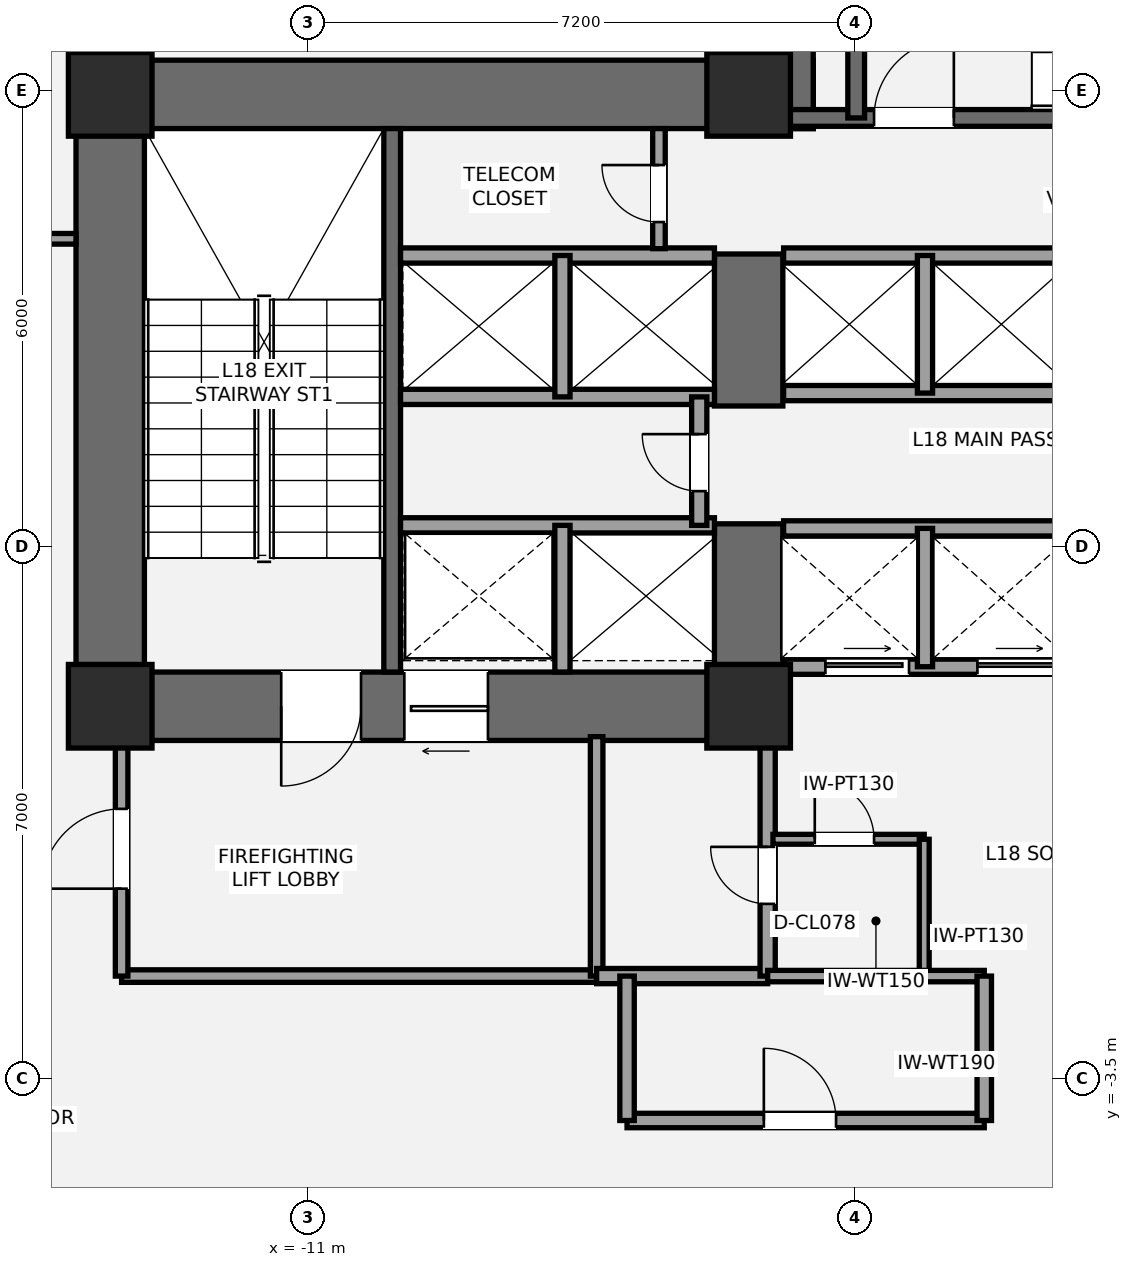
"""IFC4 building model, lengths in metres.
Left out: names, types, materials, properties, quantities, classifications, styles, units other than length and angle.
Written with IfcOpenShell. Run it as: python <this file> out.ifc"""

import sys

from ifc_helpers import new_model, si_unit, direction, frame, frame_2d, origin, origin_2d, place, context, subcontext, project, spatial, rectangle, extrude, element, fill, save


model = new_model("IFC4")
c1 = context("Model", 3, precision=1e-05, world=origin(), true_north=direction((0.0, 1.0)))
c2 = subcontext(c1, "Body", "Model", "MODEL_VIEW")
j1 = project(units=[si_unit("LENGTHUNIT", "METRE"), si_unit("PLANEANGLEUNIT", "RADIAN")], contexts=[c1])
p1 = place(None, origin())
s1 = spatial("IfcSite", under=j1, at=p1, CompositionType="ELEMENT")
p2 = place(p1, origin())
s2 = spatial("IfcBuilding", under=s1, at=p2, CompositionType="ELEMENT")
p3 = place(p2, frame((0.0, 0.0, 70.2)))
s3 = spatial("IfcBuildingStorey", under=s2, at=p3, CompositionType="ELEMENT", Elevation=70.2)
p4 = place(p3, frame((-13.6, 0.95, 0.0), z_axis=(0.0, 0.0, 1.0), x_axis=(0.0, 1.0, 0.0)))
e1 = element("IfcWall", 1, at=p4, inside=s3, PredefinedType="SHEAR", context=c2, shape_type="SweptSolid", body=[
    extrude(rectangle(XDim=8.95, YDim=0.9, at=frame_2d((4.475, 0.0))), origin(), (0.0, 0.0, 1.0), 3.6),
])
p5 = place(p3, frame((-14.05, 9.45, 0.0), z_axis=(0.0, 0.0, 1.0), x_axis=(1.0, 0.0, 0.0)))
e2 = element("IfcWall", 2, at=p5, inside=s3, PredefinedType="SHEAR", context=c2, shape_type="SweptSolid", body=[
    extrude(rectangle(XDim=9.7, YDim=0.9, at=frame_2d((4.85, 0.0))), origin(), (0.0, 0.0, 1.0), 3.6),
])
p6 = place(p3, frame((-4.75, 1.4, 0.0), z_axis=(0.0, 0.0, 1.0), x_axis=(-1.0, 0.0, 0.0)))
e3 = element("IfcWall", 3, at=p6, inside=s3, PredefinedType="SHEAR", context=c2, shape_type="SweptSolid", body=[
    extrude(rectangle(XDim=9.3, YDim=0.9, at=frame_2d((4.65, 0.0))), origin(), (0.0, 0.0, 1.0), 3.6),
])
p7 = place(p6, frame((5.55, 0.0, 0.0)))
e4 = element("IfcOpeningElement", 4, at=p7, cuts=e3, PredefinedType="OPENING", context=c2, shape_type="SweptSolid", body=[
    extrude(rectangle(XDim=1.05, YDim=2.15, at=frame_2d((0.525, 1.075))), frame((0.0, 0.46, 0.0), z_axis=(0.0, -1.0, 0.0), x_axis=(1.0, 0.0, 0.0)), (0.0, 0.0, 1.0), 0.92),
])
p8 = place(p6, frame((3.88, 0.0, 0.0)))
e5 = element("IfcOpeningElement", 5, at=p8, cuts=e3, PredefinedType="OPENING", context=c2, shape_type="SweptSolid", body=[
    extrude(rectangle(XDim=1.1, YDim=2.2, at=frame_2d((0.55, 1.1))), frame((0.0, 0.46, 0.0), z_axis=(0.0, -1.0, 0.0), x_axis=(1.0, 0.0, 0.0)), (0.0, 0.0, 1.0), 0.92),
])
p9 = place(p3, frame((-5.2, 0.95, 0.0), z_axis=(0.0, 0.0, 1.0), x_axis=(0.0, 1.0, 0.0)))
e6 = element("IfcWall", 6, at=p9, inside=s3, PredefinedType="SHEAR", context=c2, shape_type="SweptSolid", body=[
    extrude(rectangle(XDim=2.85, YDim=0.9, at=frame_2d((1.425, 0.0))), origin(), (0.0, 0.0, 1.0), 3.6),
])
p10 = place(p3, frame((-5.2, 5.35, 0.0), z_axis=(0.0, 0.0, 1.0), x_axis=(0.0, 1.0, 0.0)))
e7 = element("IfcWall", 7, at=p10, inside=s3, PredefinedType="SHEAR", context=c2, shape_type="SweptSolid", body=[
    extrude(rectangle(XDim=2.0, YDim=0.9, at=frame_2d((1.0, 0.0))), origin(), (0.0, 0.0, 1.0), 3.6),
])
p11 = place(p3, frame((-9.89, 1.85, 0.0), z_axis=(0.0, 0.0, 1.0), x_axis=(0.0, 1.0, 0.0)))
e8 = element("IfcWall", 8, at=p11, inside=s3, PredefinedType="SHEAR", context=c2, shape_type="SweptSolid", body=[
    extrude(rectangle(XDim=7.15, YDim=0.22, at=frame_2d((3.575, 0.0))), origin(), (0.0, 0.0, 1.0), 3.6),
])
p12 = place(p3, frame((-4.8, 9.0, 0.0), z_axis=(0.0, 0.0, 1.0), x_axis=(0.0, 1.0, 0.0)))
e9 = element("IfcWall", 9, at=p12, inside=s3, PredefinedType="SHEAR", context=c2, shape_type="SweptSolid", body=[
    extrude(rectangle(XDim=4.3, YDim=0.9, at=frame_2d((2.15, 0.0))), origin(), (0.0, 0.0, 1.0), 3.6),
])
p13 = place(p3, frame((-4.7, 9.14, 0.0), z_axis=(0.0, 0.0, 1.0), x_axis=(1.0, 0.0, 0.0)))
e10 = element("IfcWall", 10, at=p13, inside=s3, PredefinedType="SHEAR", context=c2, shape_type="SweptSolid", body=[
    extrude(rectangle(XDim=9.3, YDim=0.22, at=frame_2d((4.65, 0.0))), origin(), (0.0, 0.0, 1.0), 3.6),
])
p14 = place(p13, frame((1.15, 0.0, 0.0)))
e11 = element("IfcOpeningElement", 11, at=p14, cuts=e10, PredefinedType="OPENING", context=c2, shape_type="SweptSolid", body=[
    extrude(rectangle(XDim=1.05, YDim=2.15, at=frame_2d((0.525, 1.075))), frame((0.0, 0.12, 0.0), z_axis=(0.0, -1.0, 0.0), x_axis=(1.0, 0.0, 0.0)), (0.0, 0.0, 1.0), 0.24),
])
p15 = place(p3, frame((-3.785, 9.14, 0.0), z_axis=(0.0, 0.0, 1.0), x_axis=(0.0, 1.0, 0.0)))
e12 = element("IfcWall", 12, at=p15, inside=s3, PredefinedType="SHEAR", context=c2, shape_type="SweptSolid", body=[
    extrude(rectangle(XDim=3.26, YDim=0.22, at=frame_2d((1.63, 0.0))), origin(), (0.0, 0.0, 1.0), 3.6),
])
for number, where, z_axis, x_axis in (
    (13, (-13.6, 1.4, 0.0), (0.0, 0.0, 1.0), (1.0, 0.0, 0.0)),
    (14, (-13.6, 9.45, 0.0), (0.0, 0.0, 1.0), (1.0, 0.0, 0.0)),
    (15, (-5.2, 1.4, 0.0), (0.0, 0.0, 1.0), (1.0, 0.0, 0.0)),
    (16, (-5.2, 9.45, 0.0), (0.0, 0.0, 1.0), (1.0, 0.0, 0.0)),
):
    element("IfcColumn", number, at=place(p3, frame(where, z_axis=z_axis, x_axis=x_axis)), inside=s3, PredefinedType="COLUMN", context=c2, shape_type="SweptSolid", body=[
        extrude(rectangle(XDim=1.1, YDim=1.1, at=origin_2d()), origin(), (0.0, 0.0, 1.0), 3.6),
    ])
p16 = place(p3, frame((-13.45, -2.15, 0.0), z_axis=(0.0, 0.0, 1.0), x_axis=(1.0, 0.0, 0.0)))
e17 = element("IfcWall", 17, at=p16, inside=s3, PredefinedType="PARTITIONING", context=c2, shape_type="SweptSolid", body=[
    extrude(rectangle(XDim=6.25, YDim=0.165, at=frame_2d((3.125, 0.0))), origin(), (0.0, 0.0, 1.0), 3.4),
])
p17 = place(p3, frame((-13.45, -2.15, 0.0), z_axis=(0.0, 0.0, 1.0), x_axis=(0.0, 1.0, 0.0)))
e18 = element("IfcWall", 18, at=p17, inside=s3, PredefinedType="PARTITIONING", context=c2, shape_type="SweptSolid", body=[
    extrude(rectangle(XDim=3.15, YDim=0.165, at=frame_2d((1.575, 0.0))), origin(), (0.0, 0.0, 1.0), 2.853),
])
p18 = place(p17, frame((1.15, 0.0, 0.0)))
e19 = element("IfcOpeningElement", 19, at=p18, cuts=e18, PredefinedType="OPENING", context=c2, shape_type="SweptSolid", body=[
    extrude(rectangle(XDim=1.05, YDim=2.15, at=frame_2d((0.525, 1.075))), frame((0.0, 0.093, 0.0), z_axis=(0.0, -1.0, 0.0), x_axis=(1.0, 0.0, 0.0)), (0.0, 0.0, 1.0), 0.185),
])
p19 = place(p3, frame((-7.2, -2.15, 0.0), z_axis=(0.0, 0.0, 1.0), x_axis=(0.0, 1.0, 0.0)))
e20 = element("IfcWall", 20, at=p19, inside=s3, PredefinedType="PARTITIONING", context=c2, shape_type="SweptSolid", body=[
    extrude(rectangle(XDim=3.15, YDim=0.165, at=frame_2d((1.575, 0.0))), origin(), (0.0, 0.0, 1.0), 3.4),
])
p20 = place(p3, frame((-7.2, -2.15, 0.0), z_axis=(0.0, 0.0, 1.0), x_axis=(1.0, 0.0, 0.0)))
e21 = element("IfcWall", 21, at=p20, inside=s3, PredefinedType="SOLIDWALL", context=c2, shape_type="SweptSolid", body=[
    extrude(rectangle(XDim=2.25, YDim=0.2, at=frame_2d((1.125, 0.0))), origin(), (0.0, 0.0, 1.0), 3.4),
])
p21 = place(p3, frame((-4.95, -2.15, 0.0), z_axis=(0.0, 0.0, 1.0), x_axis=(0.0, 1.0, 0.0)))
e22 = element("IfcWall", 22, at=p21, inside=s3, PredefinedType="SOLIDWALL", context=c2, shape_type="SweptSolid", body=[
    extrude(rectangle(XDim=3.15, YDim=0.2, at=frame_2d((1.575, 0.0))), origin(), (0.0, 0.0, 1.0), 2.853),
])
p22 = place(p21, frame((0.95, 0.0, 0.0)))
e23 = element("IfcOpeningElement", 23, at=p22, cuts=e22, PredefinedType="OPENING", context=c2, shape_type="SweptSolid", body=[
    extrude(rectangle(XDim=0.75, YDim=2.1, at=frame_2d((0.375, 1.05))), frame((0.0, 0.11, 0.0), z_axis=(0.0, -1.0, 0.0), x_axis=(1.0, 0.0, 0.0)), (0.0, 0.0, 1.0), 0.22),
])
p23 = place(p3, frame((-4.88, -0.35, 0.0), z_axis=(0.0, 0.0, 1.0), x_axis=(1.0, 0.0, 0.0)))
e24 = element("IfcWall", 24, at=p23, inside=s3, PredefinedType="PARTITIONING", context=c2, shape_type="SweptSolid", body=[
    extrude(rectangle(XDim=1.99, YDim=0.13, at=frame_2d((0.995, 0.0))), origin(), (0.0, 0.0, 1.0), 3.4),
])
p24 = place(p23, frame((0.55, 0.0, 0.0)))
e25 = element("IfcOpeningElement", 25, at=p24, cuts=e24, PredefinedType="OPENING", context=c2, shape_type="SweptSolid", body=[
    extrude(rectangle(XDim=0.78, YDim=2.1, at=frame_2d((0.39, 1.05))), frame((0.0, 0.075, 0.0), z_axis=(0.0, -1.0, 0.0), x_axis=(1.0, 0.0, 0.0)), (0.0, 0.0, 1.0), 0.15),
])
p25 = place(p3, frame((-2.89, -2.15, 0.0), z_axis=(0.0, 0.0, 1.0), x_axis=(0.0, 1.0, 0.0)))
e26 = element("IfcWall", 26, at=p25, inside=s3, PredefinedType="PARTITIONING", context=c2, shape_type="SweptSolid", body=[
    extrude(rectangle(XDim=1.8, YDim=0.13, at=frame_2d((0.9, 0.0))), origin(), (0.0, 0.0, 1.0), 3.4),
])
p26 = place(p3, frame((-9.78, 3.78, 0.0), z_axis=(0.0, 0.0, 1.0), x_axis=(1.0, 0.0, 0.0)))
e27 = element("IfcWall", 27, at=p26, inside=s3, PredefinedType="SOLIDWALL", context=c2, shape_type="SweptSolid", body=[
    extrude(rectangle(XDim=4.13, YDim=0.2, at=frame_2d((2.065, 0.0))), origin(), (0.0, 0.0, 1.0), 3.4),
])
p27 = place(p3, frame((-7.65, 1.85, 0.0), z_axis=(0.0, 0.0, 1.0), x_axis=(0.0, 1.0, 0.0)))
e28 = element("IfcWall", 28, at=p27, inside=s3, PredefinedType="SOLIDWALL", context=c2, shape_type="SweptSolid", body=[
    extrude(rectangle(XDim=1.93, YDim=0.2, at=frame_2d((0.965, 0.0))), origin(), (0.0, 0.0, 1.0), 3.4),
])
for number, where, z_axis, x_axis in (
    (29, (-9.78, 5.47, 0.0), (0.0, 0.0, 1.0), (1.0, 0.0, 0.0)),
    (30, (-9.78, 7.33, 0.0), (0.0, 0.0, 1.0), (1.0, 0.0, 0.0)),
):
    element("IfcWall", number, at=place(p3, frame(where, z_axis=z_axis, x_axis=x_axis)), inside=s3, PredefinedType="SOLIDWALL", context=c2, shape_type="SweptSolid", body=[
        extrude(rectangle(XDim=4.13, YDim=0.2, at=frame_2d((2.065, 0.0))), origin(), (0.0, 0.0, 1.0), 3.4),
    ])
p28 = place(p3, frame((-7.65, 5.47, 0.0), z_axis=(0.0, 0.0, 1.0), x_axis=(0.0, 1.0, 0.0)))
e31 = element("IfcWall", 31, at=p28, inside=s3, PredefinedType="SOLIDWALL", context=c2, shape_type="SweptSolid", body=[
    extrude(rectangle(XDim=1.86, YDim=0.2, at=frame_2d((0.93, 0.0))), origin(), (0.0, 0.0, 1.0), 3.4),
])
p29 = place(p3, frame((-5.85, 3.78, 0.0), z_axis=(0.0, 0.0, 1.0), x_axis=(0.0, 1.0, 0.0)))
e32 = element("IfcWall", 32, at=p29, inside=s3, PredefinedType="SOLIDWALL", context=c2, shape_type="SweptSolid", body=[
    extrude(rectangle(XDim=1.69, YDim=0.2, at=frame_2d((0.845, 0.0))), origin(), (0.0, 0.0, 1.0), 3.4),
])
p30 = place(p29, frame((0.45, 0.0, 0.0)))
e33 = element("IfcOpeningElement", 33, at=p30, cuts=e32, PredefinedType="OPENING", context=c2, shape_type="SweptSolid", body=[
    extrude(rectangle(XDim=0.75, YDim=2.1, at=frame_2d((0.375, 1.05))), frame((0.0, 0.11, 0.0), z_axis=(0.0, -1.0, 0.0), x_axis=(1.0, 0.0, 0.0)), (0.0, 0.0, 1.0), 0.22),
])
p31 = place(p3, frame((-4.74, 1.92, 0.0), z_axis=(0.0, 0.0, 1.0), x_axis=(1.0, 0.0, 0.0)))
e34 = element("IfcWall", 34, at=p31, inside=s3, PredefinedType="SOLIDWALL", context=c2, shape_type="SweptSolid", body=[
    extrude(rectangle(XDim=3.86, YDim=0.2, at=frame_2d((1.93, 0.0))), origin(), (0.0, 0.0, 1.0), 2.39),
])
p32 = place(p31, frame((0.55, 0.0, 0.0)))
e35 = element("IfcOpeningElement", 35, at=p32, cuts=e34, PredefinedType="OPENING", context=c2, shape_type="SweptSolid", body=[
    extrude(rectangle(XDim=1.1, YDim=2.2, at=frame_2d((0.55, 1.1))), frame((0.0, 0.11, 0.0), z_axis=(0.0, -1.0, 0.0), x_axis=(1.0, 0.0, 0.0)), (0.0, 0.0, 1.0), 0.22),
])
p33 = place(p31, frame((2.55, 0.0, 0.0)))
e36 = element("IfcOpeningElement", 36, at=p33, cuts=e34, PredefinedType="OPENING", context=c2, shape_type="SweptSolid", body=[
    extrude(rectangle(XDim=1.1, YDim=2.2, at=frame_2d((0.55, 1.1))), frame((0.0, 0.11, 0.0), z_axis=(0.0, -1.0, 0.0), x_axis=(1.0, 0.0, 0.0)), (0.0, 0.0, 1.0), 0.22),
])
p34 = place(p3, frame((-4.74, 3.74, 0.0), z_axis=(0.0, 0.0, 1.0), x_axis=(1.0, 0.0, 0.0)))
e37 = element("IfcWall", 37, at=p34, inside=s3, PredefinedType="SOLIDWALL", context=c2, shape_type="SweptSolid", body=[
    extrude(rectangle(XDim=3.86, YDim=0.2, at=frame_2d((1.93, 0.0))), origin(), (0.0, 0.0, 1.0), 3.4),
])
p35 = place(p3, frame((-2.88, 1.92, 0.0), z_axis=(0.0, 0.0, 1.0), x_axis=(0.0, 1.0, 0.0)))
e38 = element("IfcWall", 38, at=p35, inside=s3, PredefinedType="SOLIDWALL", context=c2, shape_type="SweptSolid", body=[
    extrude(rectangle(XDim=1.82, YDim=0.2, at=frame_2d((0.91, 0.0))), origin(), (0.0, 0.0, 1.0), 3.4),
])
for number, where, z_axis, x_axis in (
    (39, (-4.74, 5.52, 0.0), (0.0, 0.0, 1.0), (1.0, 0.0, 0.0)),
    (40, (-4.74, 7.33, 0.0), (0.0, 0.0, 1.0), (1.0, 0.0, 0.0)),
):
    element("IfcWall", number, at=place(p3, frame(where, z_axis=z_axis, x_axis=x_axis)), inside=s3, PredefinedType="SOLIDWALL", context=c2, shape_type="SweptSolid", body=[
        extrude(rectangle(XDim=3.86, YDim=0.2, at=frame_2d((1.93, 0.0))), origin(), (0.0, 0.0, 1.0), 3.4),
    ])
p36 = place(p3, frame((-2.88, 5.52, 0.0), z_axis=(0.0, 0.0, 1.0), x_axis=(0.0, 1.0, 0.0)))
e41 = element("IfcWall", 41, at=p36, inside=s3, PredefinedType="SOLIDWALL", context=c2, shape_type="SweptSolid", body=[
    extrude(rectangle(XDim=1.81, YDim=0.2, at=frame_2d((0.905, 0.0))), origin(), (0.0, 0.0, 1.0), 3.4),
])
p37 = place(p3, frame((-6.38, 7.42, 0.0), z_axis=(0.0, 0.0, 1.0), x_axis=(0.0, 1.0, 0.0)))
e42 = element("IfcWall", 42, at=p37, inside=s3, PredefinedType="PARTITIONING", context=c2, shape_type="SweptSolid", body=[
    extrude(rectangle(XDim=1.58, YDim=0.165, at=frame_2d((0.79, 0.0))), origin(), (0.0, 0.0, 1.0), 3.4),
])
p38 = place(p37, frame((0.35, 0.0, 0.0)))
e43 = element("IfcOpeningElement", 43, at=p38, cuts=e42, PredefinedType="OPENING", context=c2, shape_type="SweptSolid", body=[
    extrude(rectangle(XDim=0.75, YDim=2.1, at=frame_2d((0.375, 1.05))), frame((0.0, 0.093, 0.0), z_axis=(0.0, -1.0, 0.0), x_axis=(1.0, 0.0, 0.0)), (0.0, 0.0, 1.0), 0.185),
])
p39 = place(p3, frame((-6.8, -4.05, 0.0), z_axis=(0.0, 0.0, 1.0), x_axis=(1.0, 0.0, 0.0)))
e44 = element("IfcWall", 44, at=p39, inside=s3, PredefinedType="PLUMBINGWALL", context=c2, shape_type="SweptSolid", body=[
    extrude(rectangle(XDim=4.7, YDim=0.19, at=frame_2d((2.35, 0.0))), origin(), (0.0, 0.0, 1.0), 2.933),
])
p40 = place(p39, frame((1.8, 0.0, 0.0)))
e45 = element("IfcOpeningElement", 45, at=p40, cuts=e44, PredefinedType="OPENING", context=c2, shape_type="SweptSolid", body=[
    extrude(rectangle(XDim=0.95, YDim=2.15, at=frame_2d((0.475, 1.075))), frame((0.0, 0.105, 0.0), z_axis=(0.0, -1.0, 0.0), x_axis=(1.0, 0.0, 0.0)), (0.0, 0.0, 1.0), 0.21),
])
p41 = place(p3, frame((-4.95, -2.15, 0.0), z_axis=(0.0, 0.0, 1.0), x_axis=(1.0, 0.0, 0.0)))
e46 = element("IfcWall", 46, at=p41, inside=s3, PredefinedType="PLUMBINGWALL", context=c2, shape_type="SweptSolid", body=[
    extrude(rectangle(XDim=2.85, YDim=0.15, at=frame_2d((1.425, 0.0))), origin(), (0.0, 0.0, 1.0), 3.4),
])
for number, where, z_axis, x_axis in (
    (47, (-6.8, -4.05, 0.0), (0.0, 0.0, 1.0), (0.0, 1.0, 0.0)),
    (48, (-2.1, -4.05, 0.0), (0.0, 0.0, 1.0), (0.0, 1.0, 0.0)),
):
    element("IfcWall", number, at=place(p3, frame(where, z_axis=z_axis, x_axis=x_axis)), inside=s3, PredefinedType="PLUMBINGWALL", context=c2, shape_type="SweptSolid", body=[
        extrude(rectangle(XDim=1.9, YDim=0.19, at=frame_2d((0.95, 0.0))), origin(), (0.0, 0.0, 1.0), 3.4),
    ])
p42 = place(p3, frame((-26.234, 7.55, 0.0), z_axis=(0.0, 0.0, 1.0), x_axis=(1.0, 0.0, 0.0)))
e49 = element("IfcWall", 49, at=p42, inside=s3, PredefinedType="PARTITIONING", context=c2, shape_type="SweptSolid", body=[
    extrude(rectangle(XDim=12.184, YDim=0.14, at=frame_2d((6.092, 0.0))), origin(), (0.0, 0.0, 1.0), 3.4),
])
p43 = place(p42, frame((1.84, 0.0, 0.0)))
e50 = element("IfcOpeningElement", 50, at=p43, cuts=e49, PredefinedType="OPENING", context=c2, shape_type="SweptSolid", body=[
    extrude(rectangle(XDim=0.92, YDim=2.15, at=frame_2d((0.46, 1.075))), frame((0.0, 0.08, 0.0), z_axis=(0.0, -1.0, 0.0), x_axis=(1.0, 0.0, 0.0)), (0.0, 0.0, 1.0), 0.16),
])
p44 = place(p7, origin())
e51 = element("IfcDoor", 51, at=p44, inside=s3, OperationType="SINGLE_SWING_RIGHT", PredefinedType="DOOR", context=c2, shape_type="SweptSolid", body=[
    extrude(rectangle(XDim=1.05, YDim=2.15, at=frame_2d((0.525, 1.075))), frame((0.0, 0.025, 0.0), z_axis=(0.0, -1.0, 0.0), x_axis=(1.0, 0.0, 0.0)), (0.0, 0.0, 1.0), 0.05),
])
fill(e4, e51)
p45 = place(p14, origin())
e52 = element("IfcDoor", 52, at=p45, inside=s3, OperationType="SINGLE_SWING_RIGHT", PredefinedType="DOOR", context=c2, shape_type="SweptSolid", body=[
    extrude(rectangle(XDim=1.05, YDim=2.15, at=frame_2d((0.525, 1.075))), frame((0.0, 0.025, 0.0), z_axis=(0.0, -1.0, 0.0), x_axis=(1.0, 0.0, 0.0)), (0.0, 0.0, 1.0), 0.05),
])
fill(e11, e52)
p46 = place(p18, origin())
e53 = element("IfcDoor", 53, at=p46, inside=s3, OperationType="SINGLE_SWING_LEFT", PredefinedType="DOOR", context=c2, shape_type="SweptSolid", body=[
    extrude(rectangle(XDim=1.05, YDim=2.15, at=frame_2d((0.525, 1.075))), frame((0.0, 0.025, 0.0), z_axis=(0.0, -1.0, 0.0), x_axis=(1.0, 0.0, 0.0)), (0.0, 0.0, 1.0), 0.05),
])
fill(e19, e53)
p47 = place(p22, origin())
e54 = element("IfcDoor", 54, at=p47, inside=s3, OperationType="SINGLE_SWING_RIGHT", PredefinedType="DOOR", context=c2, shape_type="SweptSolid", body=[
    extrude(rectangle(XDim=0.75, YDim=2.1, at=frame_2d((0.375, 1.05))), frame((0.0, 0.025, 0.0), z_axis=(0.0, -1.0, 0.0), x_axis=(1.0, 0.0, 0.0)), (0.0, 0.0, 1.0), 0.05),
])
fill(e23, e54)
p48 = place(p24, origin())
e55 = element("IfcDoor", 55, at=p48, inside=s3, OperationType="SINGLE_SWING_LEFT", PredefinedType="DOOR", context=c2, shape_type="SweptSolid", body=[
    extrude(rectangle(XDim=0.78, YDim=2.1, at=frame_2d((0.39, 1.05))), frame((0.0, 0.025, 0.0), z_axis=(0.0, -1.0, 0.0), x_axis=(1.0, 0.0, 0.0)), (0.0, 0.0, 1.0), 0.05),
])
fill(e25, e55)
p49 = place(p8, origin())
e56 = element("IfcDoor", 56, at=p49, inside=s3, OperationType="SLIDING_TO_LEFT", PredefinedType="DOOR", context=c2, shape_type="SweptSolid", body=[
    extrude(rectangle(XDim=1.1, YDim=2.2, at=frame_2d((0.55, 1.1))), frame((0.0, 0.025, 0.0), z_axis=(0.0, -1.0, 0.0), x_axis=(1.0, 0.0, 0.0)), (0.0, 0.0, 1.0), 0.05),
])
fill(e5, e56)
p50 = place(p30, origin())
e57 = element("IfcDoor", 57, at=p50, inside=s3, OperationType="SINGLE_SWING_RIGHT", PredefinedType="DOOR", context=c2, shape_type="SweptSolid", body=[
    extrude(rectangle(XDim=0.75, YDim=2.1, at=frame_2d((0.375, 1.05))), frame((0.0, 0.025, 0.0), z_axis=(0.0, -1.0, 0.0), x_axis=(1.0, 0.0, 0.0)), (0.0, 0.0, 1.0), 0.05),
])
fill(e33, e57)
p51 = place(p32, origin())
e58 = element("IfcDoor", 58, at=p51, inside=s3, OperationType="SLIDING_TO_LEFT", PredefinedType="DOOR", context=c2, shape_type="SweptSolid", body=[
    extrude(rectangle(XDim=1.1, YDim=2.2, at=frame_2d((0.55, 1.1))), frame((0.0, 0.025, 0.0), z_axis=(0.0, -1.0, 0.0), x_axis=(1.0, 0.0, 0.0)), (0.0, 0.0, 1.0), 0.05),
])
fill(e35, e58)
p52 = place(p33, origin())
e59 = element("IfcDoor", 59, at=p52, inside=s3, OperationType="SLIDING_TO_LEFT", PredefinedType="DOOR", context=c2, shape_type="SweptSolid", body=[
    extrude(rectangle(XDim=1.1, YDim=2.2, at=frame_2d((0.55, 1.1))), frame((0.0, 0.025, 0.0), z_axis=(0.0, -1.0, 0.0), x_axis=(1.0, 0.0, 0.0)), (0.0, 0.0, 1.0), 0.05),
])
fill(e36, e59)
p53 = place(p38, origin())
e60 = element("IfcDoor", 60, at=p53, inside=s3, OperationType="SINGLE_SWING_RIGHT", PredefinedType="DOOR", context=c2, shape_type="SweptSolid", body=[
    extrude(rectangle(XDim=0.75, YDim=2.1, at=frame_2d((0.375, 1.05))), frame((0.0, 0.025, 0.0), z_axis=(0.0, -1.0, 0.0), x_axis=(1.0, 0.0, 0.0)), (0.0, 0.0, 1.0), 0.05),
])
fill(e43, e60)
p54 = place(p40, origin())
e61 = element("IfcDoor", 61, at=p54, inside=s3, OperationType="SINGLE_SWING_LEFT", PredefinedType="DOOR", context=c2, shape_type="SweptSolid", body=[
    extrude(rectangle(XDim=0.95, YDim=2.15, at=frame_2d((0.475, 1.075))), frame((0.0, 0.025, 0.0), z_axis=(0.0, -1.0, 0.0), x_axis=(1.0, 0.0, 0.0)), (0.0, 0.0, 1.0), 0.05),
])
fill(e45, e61)
save(model, sys.argv[1])
